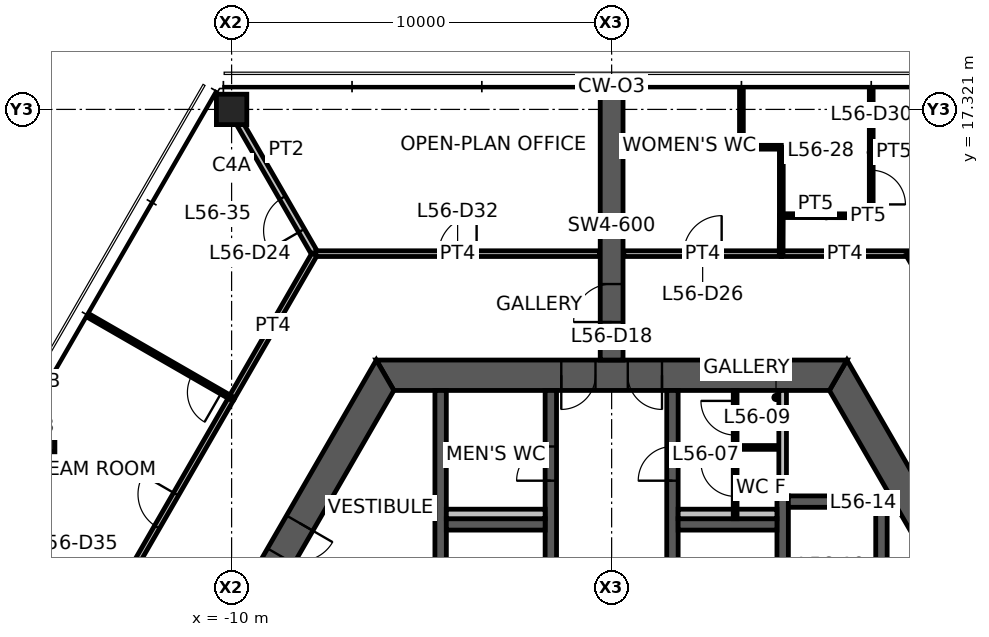
"""IFC4 building model, lengths in metres.
Left out: names, types, materials, properties, quantities, classifications, styles, units other than length and angle.
Written with IfcOpenShell. Run it as: python <this file> out.ifc"""

import sys

from ifc_helpers import new_model, si_unit, direction, frame, frame_2d, origin, origin_2d, place, context, subcontext, project, spatial, polyline, rectangle, hollow_rectangle, outline, extrude, element, fill, save


model = new_model("IFC4")
c1 = context("Model", 3, precision=1e-05, world=origin(), true_north=direction((0.0, 1.0)))
c2 = subcontext(c1, "Body", "Model", "MODEL_VIEW")
j1 = project(units=[si_unit("LENGTHUNIT", "METRE"), si_unit("PLANEANGLEUNIT", "RADIAN")], contexts=[c1])
p1 = place(None, origin())
s1 = spatial("IfcSite", under=j1, at=p1, CompositionType="ELEMENT")
p2 = place(p1, origin())
s2 = spatial("IfcBuilding", under=s1, at=p2, CompositionType="ELEMENT")
p3 = place(p2, frame((0.0, 0.0, 224.5)))
s3 = spatial("IfcBuildingStorey", under=s2, at=p3, CompositionType="ELEMENT", Elevation=224.5)
p4 = place(p3, frame((-10.0, 17.321, 0.0), z_axis=(0.0, 0.0, 1.0), x_axis=(1.0, 0.0, 0.0)))
e1 = element("IfcColumn", 1, at=p4, inside=s3, PredefinedType="COLUMN", context=c2, shape_type="SweptSolid", body=[
    extrude(hollow_rectangle(XDim=0.8, YDim=0.8, WallThickness=0.04, at=origin_2d()), origin(), (0.0, 0.0, 1.0), 3.9),
])
p5 = place(p3, frame((-15.0, 8.66, 0.0), z_axis=(0.0, 0.0, 1.0), x_axis=(1.0, 0.0, 0.0)))
e2 = element("IfcColumn", 2, at=p5, inside=s3, PredefinedType="COLUMN", context=c2, shape_type="SweptSolid", body=[
    extrude(hollow_rectangle(XDim=0.7, YDim=0.7, WallThickness=0.032, at=origin_2d()), origin(), (0.0, 0.0, 1.0), 3.9),
])
p6 = place(p3, frame((11.922, 0.0, 0.0), z_axis=(0.0, 0.0, 1.0), x_axis=(-0.500004296715, 0.866022923061, 0.0)))
e3 = element("IfcWall", 3, at=p6, inside=s3, PredefinedType="SHEAR", context=c2, shape_type="SweptSolid", body=[
    extrude(outline(polyline([(-0.231, -0.4), (5.835, -0.4), (6.635, -0.4), (12.153, -0.4), (11.691, 0.4), (6.635, 0.4), (5.835, 0.4), (0.231, 0.4), (-0.231, -0.4)])), origin(), (0.0, 0.0, 1.0), 3.9),
])
p7 = place(p6, frame((5.835, 0.0, 0.0)))
e4 = element("IfcOpeningElement", 4, at=p7, cuts=e3, PredefinedType="OPENING", context=c2, shape_type="SweptSolid", body=[
    extrude(rectangle(XDim=0.8, YDim=2.1, at=frame_2d((0.4, 1.05))), frame((0.0, 0.41, 0.0), z_axis=(0.0, -1.0, 0.0), x_axis=(1.0, 0.0, 0.0)), (0.0, 0.0, 1.0), 0.82),
])
p8 = place(p3, frame((5.961, 10.325, 0.0), z_axis=(0.0, 0.0, 1.0), x_axis=(-1.0, 0.0, 0.0)))
e5 = element("IfcWall", 5, at=p8, inside=s3, PredefinedType="SHEAR", context=c2, shape_type="SweptSolid", body=[
    extrude(outline(polyline([(-0.231, -0.4), (4.636, -0.4), (5.536, -0.4), (6.386, -0.4), (7.286, -0.4), (12.153, -0.4), (11.691, 0.4), (7.286, 0.4), (6.386, 0.4), (5.536, 0.4), (4.636, 0.4), (0.231, 0.4), (-0.231, -0.4)])), origin(), (0.0, 0.0, 1.0), 3.9),
])
p9 = place(p8, frame((6.386, 0.0, 0.0)))
e6 = element("IfcOpeningElement", 6, at=p9, cuts=e5, PredefinedType="OPENING", context=c2, shape_type="SweptSolid", body=[
    extrude(rectangle(XDim=0.9, YDim=2.1, at=frame_2d((0.45, 1.05))), frame((0.0, 0.41, 0.0), z_axis=(0.0, -1.0, 0.0), x_axis=(1.0, 0.0, 0.0)), (0.0, 0.0, 1.0), 0.82),
])
p10 = place(p8, frame((4.636, 0.0, 0.0)))
e7 = element("IfcOpeningElement", 7, at=p10, cuts=e5, PredefinedType="OPENING", context=c2, shape_type="SweptSolid", body=[
    extrude(rectangle(XDim=0.9, YDim=2.1, at=frame_2d((0.45, 1.05))), frame((0.0, 0.41, 0.0), z_axis=(0.0, -1.0, 0.0), x_axis=(1.0, 0.0, 0.0)), (0.0, 0.0, 1.0), 0.82),
])
p11 = place(p3, frame((-5.961, 10.325, 0.0), z_axis=(0.0, 0.0, 1.0), x_axis=(-0.500004296715, -0.866022923061, 0.0)))
e8 = element("IfcWall", 8, at=p11, inside=s3, PredefinedType="SHEAR", context=c2, shape_type="SweptSolid", body=[
    extrude(outline(polyline([(-0.231, -0.4), (4.494, -0.4), (5.494, -0.4), (12.153, -0.4), (11.691, 0.4), (5.494, 0.4), (4.494, 0.4), (0.231, 0.4), (-0.231, -0.4)])), origin(), (0.0, 0.0, 1.0), 3.9),
])
p12 = place(p11, frame((4.494, 0.0, 0.0)))
e9 = element("IfcOpeningElement", 9, at=p12, cuts=e8, PredefinedType="OPENING", context=c2, shape_type="SweptSolid", body=[
    extrude(rectangle(XDim=1.0, YDim=2.1, at=frame_2d((0.5, 1.05))), frame((0.0, 0.41, 0.0), z_axis=(0.0, -1.0, 0.0), x_axis=(1.0, 0.0, 0.0)), (0.0, 0.0, 1.0), 0.82),
])
p13 = place(p3, frame((0.0, 10.725, 0.0), z_axis=(0.0, 0.0, 1.0), x_axis=(0.0, 1.0, 0.0)))
e10 = element("IfcWall", 10, at=p13, inside=s3, PredefinedType="SHEAR", context=c2, shape_type="SweptSolid", body=[
    extrude(rectangle(XDim=7.045, YDim=0.6, at=frame_2d((3.523, 0.0))), origin(), (0.0, 0.0, 1.0), 3.9),
])
p14 = place(p13, frame((1.0, 0.0, 0.0)))
e11 = element("IfcOpeningElement", 11, at=p14, cuts=e10, PredefinedType="OPENING", context=c2, shape_type="SweptSolid", body=[
    extrude(rectangle(XDim=1.0, YDim=2.1, at=frame_2d((0.5, 1.05))), frame((0.0, 0.31, 0.0), z_axis=(0.0, -1.0, 0.0), x_axis=(1.0, 0.0, 0.0)), (0.0, 0.0, 1.0), 0.62),
])
p15 = place(p3, frame((-1.6, 3.75, 0.0), z_axis=(0.0, 0.0, 1.0), x_axis=(0.0, 1.0, 0.0)))
e12 = element("IfcWall", 12, at=p15, inside=s3, PredefinedType="SHEAR", context=c2, shape_type="SweptSolid", body=[
    extrude(rectangle(XDim=6.175, YDim=0.3, at=frame_2d((3.087, 0.0))), origin(), (0.0, 0.0, 1.0), 3.9),
])
p16 = place(p15, frame((3.8, 0.0, 0.0)))
e13 = element("IfcOpeningElement", 13, at=p16, cuts=e12, PredefinedType="OPENING", context=c2, shape_type="SweptSolid", body=[
    extrude(rectangle(XDim=0.9, YDim=2.1, at=frame_2d((0.45, 1.05))), frame((0.0, 0.16, 0.0), z_axis=(0.0, -1.0, 0.0), x_axis=(1.0, 0.0, 0.0)), (0.0, 0.0, 1.0), 0.32),
])
p17 = place(p3, frame((1.6, 3.75, 0.0), z_axis=(0.0, 0.0, 1.0), x_axis=(0.0, 1.0, 0.0)))
e14 = element("IfcWall", 14, at=p17, inside=s3, PredefinedType="SHEAR", context=c2, shape_type="SweptSolid", body=[
    extrude(rectangle(XDim=6.175, YDim=0.3, at=frame_2d((3.087, 0.0))), origin(), (0.0, 0.0, 1.0), 3.9),
])
p18 = place(p17, frame((3.8, 0.0, 0.0)))
e15 = element("IfcOpeningElement", 15, at=p18, cuts=e14, PredefinedType="OPENING", context=c2, shape_type="SweptSolid", body=[
    extrude(rectangle(XDim=0.9, YDim=2.1, at=frame_2d((0.45, 1.05))), frame((0.0, 0.16, 0.0), z_axis=(0.0, -1.0, 0.0), x_axis=(1.0, 0.0, 0.0)), (0.0, 0.0, 1.0), 0.32),
])
p19 = place(p3, frame((-4.5, 3.75, 0.0), z_axis=(0.0, 0.0, 1.0), x_axis=(0.0, 1.0, 0.0)))
e16 = element("IfcWall", 16, at=p19, inside=s3, PredefinedType="SHEAR", context=c2, shape_type="SweptSolid", body=[
    extrude(rectangle(XDim=6.175, YDim=0.3, at=frame_2d((3.087, 0.0))), origin(), (0.0, 0.0, 1.0), 3.9),
])
p20 = place(p3, frame((4.5, 3.75, 0.0), z_axis=(0.0, 0.0, 1.0), x_axis=(0.0, 1.0, 0.0)))
e17 = element("IfcWall", 17, at=p20, inside=s3, PredefinedType="SHEAR", context=c2, shape_type="SweptSolid", body=[
    extrude(rectangle(XDim=3.4, YDim=0.3, at=frame_2d((1.7, 0.0))), origin(), (0.0, 0.0, 1.0), 3.9),
])
for number, where, z_axis, x_axis in (
    (18, (-4.35, 6.4, 0.0), (0.0, 0.0, 1.0), (1.0, 0.0, 0.0)),
    (19, (1.75, 6.4, 0.0), (0.0, 0.0, 1.0), (1.0, 0.0, 0.0)),
    (20, (4.65, 7.0, 0.0), (0.0, 0.0, 1.0), (1.0, 0.0, 0.0)),
):
    element("IfcWall", number, at=place(p3, frame(where, z_axis=z_axis, x_axis=x_axis)), inside=s3, PredefinedType="SHEAR", context=c2, shape_type="SweptSolid", body=[
        extrude(rectangle(XDim=2.6, YDim=0.3, at=frame_2d((1.3, 0.0))), origin(), (0.0, 0.0, 1.0), 3.9),
    ])
p21 = place(p3, frame((7.1, 3.75, 0.0), z_axis=(0.0, 0.0, 1.0), x_axis=(0.0, 1.0, 0.0)))
e21 = element("IfcWall", 21, at=p21, inside=s3, PredefinedType="SHEAR", context=c2, shape_type="SweptSolid", body=[
    extrude(rectangle(XDim=3.1, YDim=0.3, at=frame_2d((1.55, 0.0))), origin(), (0.0, 0.0, 1.0), 3.9),
])
p22 = place(p3, frame((4.5, 7.15, 0.0), z_axis=(0.0, 0.0, 1.0), x_axis=(0.0, 1.0, 0.0)))
e22 = element("IfcWall", 22, at=p22, inside=s3, PredefinedType="STANDARD", context=c2, shape_type="SweptSolid", body=[
    extrude(rectangle(XDim=2.775, YDim=0.2, at=frame_2d((1.388, 0.0))), origin(), (0.0, 0.0, 1.0), 3.9),
])
for number, where, z_axis, x_axis in (
    (23, (-4.35, 6.675, 0.0), (0.0, 0.0, 1.0), (1.0, 0.0, 0.0)),
    (24, (1.75, 6.675, 0.0), (0.0, 0.0, 1.0), (1.0, 0.0, 0.0)),
):
    element("IfcWall", number, at=place(p3, frame(where, z_axis=z_axis, x_axis=x_axis)), inside=s3, PredefinedType="PLUMBINGWALL", context=c2, shape_type="SweptSolid", body=[
        extrude(rectangle(XDim=2.6, YDim=0.25, at=frame_2d((1.3, 0.0))), origin(), (0.0, 0.0, 1.0), 3.9),
    ])
p23 = place(p3, frame((3.25, 6.55, 0.0), z_axis=(0.0, 0.0, 1.0), x_axis=(0.0, 1.0, 0.0)))
e25 = element("IfcWall", 25, at=p23, inside=s3, PredefinedType="PARTITIONING", context=c2, shape_type="SweptSolid", body=[
    extrude(rectangle(XDim=3.375, YDim=0.1, at=frame_2d((1.688, 0.0))), origin(), (0.0, 0.0, 1.0), 2.95),
])
p24 = place(p23, frame((0.587, 0.0, 0.0)))
e26 = element("IfcOpeningElement", 26, at=p24, cuts=e25, PredefinedType="OPENING", context=c2, shape_type="SweptSolid", body=[
    extrude(rectangle(XDim=0.9, YDim=2.1, at=frame_2d((0.45, 1.05))), frame((0.0, 0.06, 0.0), z_axis=(0.0, -1.0, 0.0), x_axis=(1.0, 0.0, 0.0)), (0.0, 0.0, 1.0), 0.12),
])
p25 = place(p23, frame((2.2, 0.0, 0.0)))
e27 = element("IfcOpeningElement", 27, at=p25, cuts=e25, PredefinedType="OPENING", context=c2, shape_type="SweptSolid", body=[
    extrude(rectangle(XDim=0.9, YDim=2.1, at=frame_2d((0.45, 1.05))), frame((0.0, 0.06, 0.0), z_axis=(0.0, -1.0, 0.0), x_axis=(1.0, 0.0, 0.0)), (0.0, 0.0, 1.0), 0.12),
])
p26 = place(p3, frame((3.3, 8.425, 0.0), z_axis=(0.0, 0.0, 1.0), x_axis=(1.0, 0.0, 0.0)))
e28 = element("IfcWall", 28, at=p26, inside=s3, PredefinedType="PARTITIONING", context=c2, shape_type="SweptSolid", body=[
    extrude(rectangle(XDim=1.05, YDim=0.1, at=frame_2d((0.525, 0.0))), origin(), (0.0, 0.0, 1.0), 2.95),
])
p27 = place(p3, frame((-7.809, 13.525, 0.0), z_axis=(0.0, 0.0, 1.0), x_axis=(-0.499997299682, 0.866026962808, 0.0)))
e29 = element("IfcWall", 29, at=p27, inside=s3, PredefinedType="PARTITIONING", context=c2, shape_type="SweptSolid", body=[
    extrude(rectangle(XDim=4.383, YDim=0.175, at=frame_2d((2.191, 0.0))), origin(), (0.0, 0.0, 1.0), 3.05),
])
p28 = place(p27, frame((0.7, 0.0, 0.0)))
e30 = element("IfcOpeningElement", 30, at=p28, cuts=e29, PredefinedType="OPENING", context=c2, shape_type="SweptSolid", body=[
    extrude(rectangle(XDim=1.0, YDim=2.1, at=frame_2d((0.5, 1.05))), frame((0.0, 0.098, 0.0), z_axis=(0.0, -1.0, 0.0), x_axis=(1.0, 0.0, 0.0)), (0.0, 0.0, 1.0), 0.195),
])
p29 = place(p3, frame((0.32, 13.525, 0.0), z_axis=(0.0, 0.0, 1.0), x_axis=(1.0, 0.0, 0.0)))
e31 = element("IfcWall", 31, at=p29, inside=s3, PredefinedType="PARTITIONING", context=c2, shape_type="SweptSolid", body=[
    extrude(rectangle(XDim=4.15, YDim=0.15, at=frame_2d((2.075, 0.0))), origin(), (0.0, 0.0, 1.0), 2.95),
])
p30 = place(p29, frame((1.575, 0.0, 0.0)))
e32 = element("IfcOpeningElement", 32, at=p30, cuts=e31, PredefinedType="OPENING", context=c2, shape_type="SweptSolid", body=[
    extrude(rectangle(XDim=1.0, YDim=2.1, at=frame_2d((0.5, 1.05))), frame((0.0, 0.085, 0.0), z_axis=(0.0, -1.0, 0.0), x_axis=(1.0, 0.0, 0.0)), (0.0, 0.0, 1.0), 0.17),
])
p31 = place(p3, frame((4.46, 13.525, 0.0), z_axis=(0.0, 0.0, 1.0), x_axis=(1.0, 0.0, 0.0)))
e33 = element("IfcWall", 33, at=p31, inside=s3, PredefinedType="PARTITIONING", context=c2, shape_type="SweptSolid", body=[
    extrude(rectangle(XDim=3.348, YDim=0.15, at=frame_2d((1.674, 0.0))), origin(), (0.0, 0.0, 1.0), 2.95),
])
p32 = place(p3, frame((7.809, 13.525, 0.0), z_axis=(0.0, 0.0, 1.0), x_axis=(0.500001088571, -0.866024775297, 0.0)))
e34 = element("IfcWall", 34, at=p32, inside=s3, PredefinedType="PARTITIONING", context=c2, shape_type="SweptSolid", body=[
    extrude(rectangle(XDim=3.413, YDim=0.15, at=frame_2d((1.707, 0.0))), origin(), (0.0, 0.0, 1.0), 2.95),
])
p33 = place(p3, frame((3.415, 16.325, 0.0), z_axis=(0.0, 0.0, 1.0), x_axis=(1.0, 0.0, 0.0)))
e35 = element("IfcWall", 35, at=p33, inside=s3, PredefinedType="PARTITIONING", context=c2, shape_type="SweptSolid", body=[
    extrude(rectangle(XDim=1.05, YDim=0.1, at=frame_2d((0.525, 0.0))), origin(), (0.0, 0.0, 1.0), 2.95),
])
p34 = place(p3, frame((3.415, 17.801, 0.0), z_axis=(0.0, 0.0, 1.0), x_axis=(0.0, -1.0, 0.0)))
e36 = element("IfcWall", 36, at=p34, inside=s3, PredefinedType="PARTITIONING", context=c2, shape_type="SweptSolid", body=[
    extrude(rectangle(XDim=1.476, YDim=0.1, at=frame_2d((0.738, 0.0))), origin(), (0.0, 0.0, 1.0), 2.95),
])
p35 = place(p3, frame((4.465, 16.325, 0.0), z_axis=(0.0, 0.0, 1.0), x_axis=(0.0, -1.0, 0.0)))
e37 = element("IfcWall", 37, at=p35, inside=s3, PredefinedType="PARTITIONING", context=c2, shape_type="SweptSolid", body=[
    extrude(rectangle(XDim=1.81, YDim=0.1, at=frame_2d((0.905, 0.0))), origin(), (0.0, 0.0, 1.0), 2.95),
])
p36 = place(p3, frame((4.465, 14.525, 0.0), z_axis=(0.0, 0.0, 1.0), x_axis=(-0.00463862197, -0.999989241535, 0.0)))
e38 = element("IfcWall", 38, at=p36, inside=s3, PredefinedType="PARTITIONING", context=c2, shape_type="SweptSolid", body=[
    extrude(rectangle(XDim=1.0, YDim=0.1, at=frame_2d((0.5, 0.0))), origin(), (0.0, 0.0, 1.0), 2.95),
])
p37 = place(p3, frame((6.831, 14.521, 0.0), z_axis=(0.0, 0.0, 1.0), x_axis=(-0.999998274693, 0.001857581934, 0.0)))
e39 = element("IfcWall", 39, at=p37, inside=s3, PredefinedType="PARTITIONING", context=c2, shape_type="SweptSolid", body=[
    extrude(rectangle(XDim=2.366, YDim=0.1, at=frame_2d((1.183, 0.0))), origin(), (0.0, 0.0, 1.0), 2.95),
])
p38 = place(p3, frame((6.831, 17.855, 0.0), z_axis=(0.0, 0.0, 1.0), x_axis=(0.0, -1.0, 0.0)))
e40 = element("IfcWall", 40, at=p38, inside=s3, PredefinedType="PARTITIONING", context=c2, shape_type="SweptSolid", body=[
    extrude(rectangle(XDim=3.335, YDim=0.1, at=frame_2d((1.667, 0.0))), origin(), (0.0, 0.0, 1.0), 2.95),
])
p39 = place(p38, frame((2.135, 0.0, 0.0)))
e41 = element("IfcOpeningElement", 41, at=p39, cuts=e40, PredefinedType="OPENING", context=c2, shape_type="SweptSolid", body=[
    extrude(rectangle(XDim=0.9, YDim=2.1, at=frame_2d((0.45, 1.05))), frame((0.0, 0.06, 0.0), z_axis=(0.0, -1.0, 0.0), x_axis=(1.0, 0.0, 0.0)), (0.0, 0.0, 1.0), 0.12),
])
p40 = place(p3, frame((-7.786, 13.525, 0.0), z_axis=(0.0, 0.0, 1.0), x_axis=(1.0, 0.0, 0.0)))
e42 = element("IfcWall", 42, at=p40, inside=s3, PredefinedType="PARTITIONING", context=c2, shape_type="SweptSolid", body=[
    extrude(rectangle(XDim=7.466, YDim=0.15, at=frame_2d((3.733, 0.0))), origin(), (0.0, 0.0, 1.0), 2.95),
])
p41 = place(p40, frame((3.233, 0.0, 0.0)))
e43 = element("IfcOpeningElement", 43, at=p41, cuts=e42, PredefinedType="OPENING", context=c2, shape_type="SweptSolid", body=[
    extrude(rectangle(XDim=1.0, YDim=2.1, at=frame_2d((0.5, 1.05))), frame((0.0, 0.085, 0.0), z_axis=(0.0, -1.0, 0.0), x_axis=(1.0, 0.0, 0.0)), (0.0, 0.0, 1.0), 0.17),
])
p42 = place(p3, frame((-10.008, 9.716, 0.0), z_axis=(0.0, 0.0, 1.0), x_axis=(0.500004234368, 0.866022959057, 0.0)))
e44 = element("IfcWall", 44, at=p42, inside=s3, PredefinedType="PARTITIONING", context=c2, shape_type="SweptSolid", body=[
    extrude(rectangle(XDim=4.375, YDim=0.15, at=frame_2d((2.188, 0.0))), origin(), (0.0, 0.0, 1.0), 2.95),
])
p43 = place(p3, frame((-13.423, 3.801, 0.0), z_axis=(0.0, 0.0, 1.0), x_axis=(0.500020088259, 0.866013805512, 0.0)))
e45 = element("IfcWall", 45, at=p43, inside=s3, PredefinedType="PARTITIONING", context=c2, shape_type="SweptSolid", body=[
    extrude(rectangle(XDim=6.84, YDim=0.15, at=frame_2d((3.42, 0.0))), origin(), (0.0, 0.0, 1.0), 2.95),
])
p44 = place(p43, frame((2.92, 0.0, 0.0)))
e46 = element("IfcOpeningElement", 46, at=p44, cuts=e45, PredefinedType="OPENING", context=c2, shape_type="SweptSolid", body=[
    extrude(rectangle(XDim=1.0, YDim=2.1, at=frame_2d((0.5, 1.05))), frame((0.0, 0.085, 0.0), z_axis=(0.0, -1.0, 0.0), x_axis=(1.0, 0.0, 0.0)), (0.0, 0.0, 1.0), 0.17),
])
p45 = place(p3, frame((-17.171, 5.97, 0.0), z_axis=(0.0, 0.0, 1.0), x_axis=(0.865485466478, -0.500934034894, 0.0)))
e47 = element("IfcWall", 47, at=p45, inside=s3, PredefinedType="PARTITIONING", context=c2, shape_type="SweptSolid", body=[
    extrude(rectangle(XDim=4.33, YDim=0.1, at=frame_2d((2.165, 0.0))), origin(), (0.0, 0.0, 1.0), 2.95),
])
p46 = place(p45, frame((3.131, 0.0, 0.0)))
e48 = element("IfcOpeningElement", 48, at=p46, cuts=e47, PredefinedType="OPENING", context=c2, shape_type="SweptSolid", body=[
    extrude(rectangle(XDim=0.9, YDim=2.1, at=frame_2d((0.45, 1.05))), frame((0.0, 0.06, 0.0), z_axis=(0.0, -1.0, 0.0), x_axis=(1.0, 0.0, 0.0)), (0.0, 0.0, 1.0), 0.12),
])
p47 = place(p3, frame((-10.003, 9.724, 0.0), z_axis=(0.0, 0.0, 1.0), x_axis=(-0.866566724083, 0.499061231426, 0.0)))
e49 = element("IfcWall", 49, at=p47, inside=s3, PredefinedType="PARTITIONING", context=c2, shape_type="SweptSolid", body=[
    extrude(rectangle(XDim=4.305, YDim=0.1, at=frame_2d((2.153, 0.0))), origin(), (0.0, 0.0, 1.0), 2.95),
])
p48 = place(p47, frame((0.3, 0.0, 0.0)))
e50 = element("IfcOpeningElement", 50, at=p48, cuts=e49, PredefinedType="OPENING", context=c2, shape_type="SweptSolid", body=[
    extrude(rectangle(XDim=0.9, YDim=2.1, at=frame_2d((0.45, 1.05))), frame((0.0, 0.06, 0.0), z_axis=(0.0, -1.0, 0.0), x_axis=(1.0, 0.0, 0.0)), (0.0, 0.0, 1.0), 0.12),
])
p49 = place(p3, frame((0.0, 17.771, 0.0), z_axis=(0.0, 0.0, 1.0), x_axis=(0.0, 1.0, 0.0)))
e51 = element("IfcWall", 51, at=p49, inside=s3, PredefinedType="PARTITIONING", context=c2, shape_type="SweptSolid", body=[
    extrude(rectangle(XDim=0.085, YDim=0.175, at=frame_2d((0.042, 0.0))), origin(), (0.0, 0.0, 1.0), 3.9),
])
p50 = place(p9, origin())
e52 = element("IfcDoor", 52, at=p50, inside=s3, OperationType="SINGLE_SWING_RIGHT", PredefinedType="DOOR", context=c2, shape_type="SweptSolid", body=[
    extrude(rectangle(XDim=0.9, YDim=2.1, at=frame_2d((0.45, 1.05))), frame((0.0, 0.025, 0.0), z_axis=(0.0, -1.0, 0.0), x_axis=(1.0, 0.0, 0.0)), (0.0, 0.0, 1.0), 0.05),
])
fill(e6, e52)
p51 = place(p10, origin())
e53 = element("IfcDoor", 53, at=p51, inside=s3, OperationType="SINGLE_SWING_LEFT", PredefinedType="DOOR", context=c2, shape_type="SweptSolid", body=[
    extrude(rectangle(XDim=0.9, YDim=2.1, at=frame_2d((0.45, 1.05))), frame((0.0, 0.025, 0.0), z_axis=(0.0, -1.0, 0.0), x_axis=(1.0, 0.0, 0.0)), (0.0, 0.0, 1.0), 0.05),
])
fill(e7, e53)
p52 = place(p12, origin())
e54 = element("IfcDoor", 54, at=p52, inside=s3, OperationType="SINGLE_SWING_LEFT", PredefinedType="DOOR", context=c2, shape_type="SweptSolid", body=[
    extrude(rectangle(XDim=1.0, YDim=2.1, at=frame_2d((0.5, 1.05))), frame((0.0, 0.025, 0.0), z_axis=(0.0, -1.0, 0.0), x_axis=(1.0, 0.0, 0.0)), (0.0, 0.0, 1.0), 0.05),
])
fill(e9, e54)
p53 = place(p16, origin())
e55 = element("IfcDoor", 55, at=p53, inside=s3, OperationType="SINGLE_SWING_LEFT", PredefinedType="DOOR", context=c2, shape_type="SweptSolid", body=[
    extrude(rectangle(XDim=0.9, YDim=2.1, at=frame_2d((0.45, 1.05))), frame((0.0, 0.025, 0.0), z_axis=(0.0, -1.0, 0.0), x_axis=(1.0, 0.0, 0.0)), (0.0, 0.0, 1.0), 0.05),
])
fill(e13, e55)
p54 = place(p18, origin())
e56 = element("IfcDoor", 56, at=p54, inside=s3, OperationType="SINGLE_SWING_LEFT", PredefinedType="DOOR", context=c2, shape_type="SweptSolid", body=[
    extrude(rectangle(XDim=0.9, YDim=2.1, at=frame_2d((0.45, 1.05))), frame((0.0, 0.025, 0.0), z_axis=(0.0, -1.0, 0.0), x_axis=(1.0, 0.0, 0.0)), (0.0, 0.0, 1.0), 0.05),
])
fill(e15, e56)
p55 = place(p14, origin())
e57 = element("IfcDoor", 57, at=p55, inside=s3, OperationType="SINGLE_SWING_LEFT", PredefinedType="DOOR", context=c2, shape_type="SweptSolid", body=[
    extrude(rectangle(XDim=1.0, YDim=2.1, at=frame_2d((0.5, 1.05))), frame((0.0, 0.025, 0.0), z_axis=(0.0, -1.0, 0.0), x_axis=(1.0, 0.0, 0.0)), (0.0, 0.0, 1.0), 0.05),
])
fill(e11, e57)
p56 = place(p24, origin())
e58 = element("IfcDoor", 58, at=p56, inside=s3, OperationType="SINGLE_SWING_RIGHT", PredefinedType="DOOR", context=c2, shape_type="SweptSolid", body=[
    extrude(rectangle(XDim=0.9, YDim=2.1, at=frame_2d((0.45, 1.05))), frame((0.0, 0.025, 0.0), z_axis=(0.0, -1.0, 0.0), x_axis=(1.0, 0.0, 0.0)), (0.0, 0.0, 1.0), 0.05),
])
fill(e26, e58)
p57 = place(p25, origin())
e59 = element("IfcDoor", 59, at=p57, inside=s3, OperationType="SINGLE_SWING_RIGHT", PredefinedType="DOOR", context=c2, shape_type="SweptSolid", body=[
    extrude(rectangle(XDim=0.9, YDim=2.1, at=frame_2d((0.45, 1.05))), frame((0.0, 0.025, 0.0), z_axis=(0.0, -1.0, 0.0), x_axis=(1.0, 0.0, 0.0)), (0.0, 0.0, 1.0), 0.05),
])
fill(e27, e59)
p58 = place(p28, origin())
e60 = element("IfcDoor", 60, at=p58, inside=s3, OperationType="SINGLE_SWING_LEFT", PredefinedType="DOOR", context=c2, shape_type="SweptSolid", body=[
    extrude(rectangle(XDim=1.0, YDim=2.1, at=frame_2d((0.5, 1.05))), frame((0.0, 0.025, 0.0), z_axis=(0.0, -1.0, 0.0), x_axis=(1.0, 0.0, 0.0)), (0.0, 0.0, 1.0), 0.05),
])
fill(e30, e60)
p59 = place(p30, origin())
e61 = element("IfcDoor", 61, at=p59, inside=s3, OperationType="SINGLE_SWING_RIGHT", PredefinedType="DOOR", context=c2, shape_type="SweptSolid", body=[
    extrude(rectangle(XDim=1.0, YDim=2.1, at=frame_2d((0.5, 1.05))), frame((0.0, 0.025, 0.0), z_axis=(0.0, -1.0, 0.0), x_axis=(1.0, 0.0, 0.0)), (0.0, 0.0, 1.0), 0.05),
])
fill(e32, e61)
p60 = place(p39, origin())
e62 = element("IfcDoor", 62, at=p60, inside=s3, OperationType="SINGLE_SWING_RIGHT", PredefinedType="DOOR", context=c2, shape_type="SweptSolid", body=[
    extrude(rectangle(XDim=0.9, YDim=2.1, at=frame_2d((0.45, 1.05))), frame((0.0, 0.025, 0.0), z_axis=(0.0, -1.0, 0.0), x_axis=(1.0, 0.0, 0.0)), (0.0, 0.0, 1.0), 0.05),
])
fill(e41, e62)
p61 = place(p41, origin())
e63 = element("IfcDoor", 63, at=p61, inside=s3, OperationType="SINGLE_SWING_RIGHT", PredefinedType="DOOR", context=c2, shape_type="SweptSolid", body=[
    extrude(rectangle(XDim=1.0, YDim=2.1, at=frame_2d((0.5, 1.05))), frame((0.0, 0.025, 0.0), z_axis=(0.0, -1.0, 0.0), x_axis=(1.0, 0.0, 0.0)), (0.0, 0.0, 1.0), 0.05),
])
fill(e43, e63)
p62 = place(p44, origin())
e64 = element("IfcDoor", 64, at=p62, inside=s3, OperationType="SINGLE_SWING_RIGHT", PredefinedType="DOOR", context=c2, shape_type="SweptSolid", body=[
    extrude(rectangle(XDim=1.0, YDim=2.1, at=frame_2d((0.5, 1.05))), frame((0.0, 0.025, 0.0), z_axis=(0.0, -1.0, 0.0), x_axis=(1.0, 0.0, 0.0)), (0.0, 0.0, 1.0), 0.05),
])
fill(e46, e64)
p63 = place(p48, origin())
e65 = element("IfcDoor", 65, at=p63, inside=s3, OperationType="SINGLE_SWING_LEFT", PredefinedType="DOOR", context=c2, shape_type="SweptSolid", body=[
    extrude(rectangle(XDim=0.9, YDim=2.1, at=frame_2d((0.45, 1.05))), frame((0.0, 0.025, 0.0), z_axis=(0.0, -1.0, 0.0), x_axis=(1.0, 0.0, 0.0)), (0.0, 0.0, 1.0), 0.05),
])
fill(e50, e65)
save(model, sys.argv[1])
